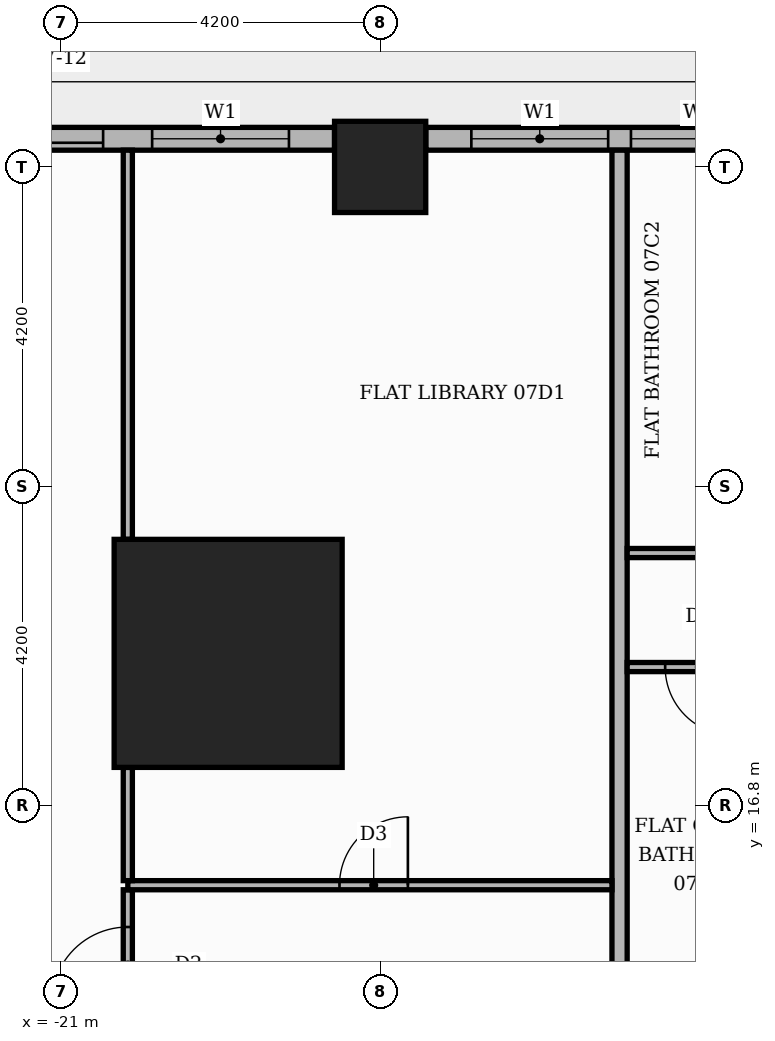
"""IFC4 building model, lengths in metres.
Left out: names, types, materials, properties, quantities, classifications, styles, units other than length and angle.
Written with IfcOpenShell. Run it as: python <this file> out.ifc"""

import sys

from ifc_helpers import new_model, si_unit, direction, frame, frame_2d, origin, origin_2d, place, context, subcontext, project, spatial, rectangle, extrude, element, fill, save


model = new_model("IFC4")
c1 = context("Model", 3, precision=1e-05, world=origin(), true_north=direction((0.0, 1.0)))
c2 = subcontext(c1, "Body", "Model", "MODEL_VIEW")
j1 = project(units=[si_unit("LENGTHUNIT", "METRE"), si_unit("PLANEANGLEUNIT", "RADIAN")], contexts=[c1])
p1 = place(None, origin())
s1 = spatial("IfcSite", under=j1, at=p1, CompositionType="ELEMENT")
p2 = place(p1, origin())
s2 = spatial("IfcBuilding", under=s1, at=p2, CompositionType="ELEMENT")
p3 = place(p2, frame((0.0, 0.0, 34.8)))
s3 = spatial("IfcBuildingStorey", under=s2, at=p3, CompositionType="ELEMENT", Elevation=34.8)
p4 = place(p3, frame((-18.8, 18.8, 0.0), z_axis=(0.0, 0.0, 1.0), x_axis=(1.0, 0.0, 0.0)))
e1 = element("IfcColumn", 1, at=p4, inside=s3, PredefinedType="COLUMN", context=c2, shape_type="SweptSolid", body=[
    extrude(rectangle(XDim=3.0, YDim=3.0, at=origin_2d()), origin(), (0.0, 0.0, 1.0), 3.9),
])
p5 = place(p3, frame((-16.8, 25.2, 0.0), z_axis=(0.0, 0.0, 1.0), x_axis=(1.0, 0.0, 0.0)))
e2 = element("IfcColumn", 2, at=p5, inside=s3, PredefinedType="COLUMN", context=c2, shape_type="SweptSolid", body=[
    extrude(rectangle(XDim=1.2, YDim=1.2, at=origin_2d()), origin(), (0.0, 0.0, 1.0), 3.9),
])
p6 = place(p3, frame((-9.0, 25.57, 0.0), z_axis=(0.0, 0.0, 1.0), x_axis=(-1.0, 0.0, 0.0)))
e3 = element("IfcWall", 3, at=p6, inside=s3, PredefinedType="STANDARD", context=c2, shape_type="SweptSolid", body=[
    extrude(rectangle(XDim=7.2, YDim=0.3, at=frame_2d((3.6, 0.0))), origin(), (0.0, 0.0, 1.0), 3.48),
])
p7 = place(p6, frame((0.6, 0.0, 0.9)))
e4 = element("IfcOpeningElement", 4, at=p7, cuts=e3, PredefinedType="OPENING", context=c2, shape_type="SweptSolid", body=[
    extrude(rectangle(XDim=1.8, YDim=2.1, at=frame_2d((0.9, 1.05))), frame((0.0, 0.16, 0.0), z_axis=(0.0, -1.0, 0.0), x_axis=(1.0, 0.0, 0.0)), (0.0, 0.0, 1.0), 0.32),
])
p8 = place(p6, frame((2.7, 0.0, 0.9)))
e5 = element("IfcOpeningElement", 5, at=p8, cuts=e3, PredefinedType="OPENING", context=c2, shape_type="SweptSolid", body=[
    extrude(rectangle(XDim=1.8, YDim=2.1, at=frame_2d((0.9, 1.05))), frame((0.0, 0.16, 0.0), z_axis=(0.0, -1.0, 0.0), x_axis=(1.0, 0.0, 0.0)), (0.0, 0.0, 1.0), 0.32),
])
p9 = place(p6, frame((4.8, 0.0, 0.9)))
e6 = element("IfcOpeningElement", 6, at=p9, cuts=e3, PredefinedType="OPENING", context=c2, shape_type="SweptSolid", body=[
    extrude(rectangle(XDim=1.8, YDim=2.1, at=frame_2d((0.9, 1.05))), frame((0.0, 0.16, 0.0), z_axis=(0.0, -1.0, 0.0), x_axis=(1.0, 0.0, 0.0)), (0.0, 0.0, 1.0), 0.32),
])
p10 = place(p3, frame((-17.4, 25.57, 0.0), z_axis=(0.0, 0.0, 1.0), x_axis=(-1.0, 0.0, 0.0)))
e7 = element("IfcWall", 7, at=p10, inside=s3, PredefinedType="STANDARD", context=c2, shape_type="SweptSolid", body=[
    extrude(rectangle(XDim=5.32, YDim=0.3, at=frame_2d((2.66, 0.0))), origin(), (0.0, 0.0, 1.0), 3.48),
])
p11 = place(p10, frame((0.6, 0.0, 0.9)))
e8 = element("IfcOpeningElement", 8, at=p11, cuts=e7, PredefinedType="OPENING", context=c2, shape_type="SweptSolid", body=[
    extrude(rectangle(XDim=1.8, YDim=2.1, at=frame_2d((0.9, 1.05))), frame((0.0, 0.16, 0.0), z_axis=(0.0, -1.0, 0.0), x_axis=(1.0, 0.0, 0.0)), (0.0, 0.0, 1.0), 0.32),
])
p12 = place(p10, frame((3.045, 0.0, 0.0)))
e9 = element("IfcOpeningElement", 9, at=p12, cuts=e7, PredefinedType="OPENING", context=c2, shape_type="SweptSolid", body=[
    extrude(rectangle(XDim=1.8, YDim=2.4, at=frame_2d((0.9, 1.2))), frame((0.0, 0.16, 0.0), z_axis=(0.0, -1.0, 0.0), x_axis=(1.0, 0.0, 0.0)), (0.0, 0.0, 1.0), 0.32),
])
p13 = place(p3, frame((-20.12, 13.71, 0.0), z_axis=(0.0, 0.0, 1.0), x_axis=(0.0, 1.0, 0.0)))
e10 = element("IfcWall", 10, at=p13, inside=s3, PredefinedType="PARTITIONING", context=c2, shape_type="SweptSolid", body=[
    extrude(rectangle(XDim=1.98, YDim=0.12, at=frame_2d((0.99, 0.0))), origin(), (0.0, 0.0, 1.0), 3.48),
])
p14 = place(p13, frame((0.49, 0.0, 0.0)))
e11 = element("IfcOpeningElement", 11, at=p14, cuts=e10, PredefinedType="OPENING", context=c2, shape_type="SweptSolid", body=[
    extrude(rectangle(XDim=1.0, YDim=2.1, at=frame_2d((0.5, 1.05))), frame((0.0, 0.07, 0.0), z_axis=(0.0, -1.0, 0.0), x_axis=(1.0, 0.0, 0.0)), (0.0, 0.0, 1.0), 0.14),
])
p15 = place(p3, frame((-13.65, 13.75, 0.0), z_axis=(0.0, 0.0, 1.0), x_axis=(0.0, 1.0, 0.0)))
e12 = element("IfcWall", 12, at=p15, inside=s3, PredefinedType="PARTITIONING", context=c2, shape_type="SweptSolid", body=[
    extrude(rectangle(XDim=11.67, YDim=0.2, at=frame_2d((5.835, 0.0))), origin(), (0.0, 0.0, 1.0), 3.48),
])
p16 = place(p3, frame((-20.12, 15.75, 0.0), z_axis=(0.0, 0.0, 1.0), x_axis=(1.0, 0.0, 0.0)))
e13 = element("IfcWall", 13, at=p16, inside=s3, PredefinedType="PARTITIONING", context=c2, shape_type="SweptSolid", body=[
    extrude(rectangle(XDim=6.37, YDim=0.12, at=frame_2d((3.185, 0.0))), origin(), (0.0, 0.0, 1.0), 3.48),
])
p17 = place(p16, frame((2.785, 0.0, 0.0)))
e14 = element("IfcOpeningElement", 14, at=p17, cuts=e13, PredefinedType="OPENING", context=c2, shape_type="SweptSolid", body=[
    extrude(rectangle(XDim=0.9, YDim=2.1, at=frame_2d((0.45, 1.05))), frame((0.0, 0.07, 0.0), z_axis=(0.0, -1.0, 0.0), x_axis=(1.0, 0.0, 0.0)), (0.0, 0.0, 1.0), 0.14),
])
p18 = place(p3, frame((-20.12, 15.81, 0.0), z_axis=(0.0, 0.0, 1.0), x_axis=(0.0, 1.0, 0.0)))
e15 = element("IfcWall", 15, at=p18, inside=s3, PredefinedType="PARTITIONING", context=c2, shape_type="SweptSolid", body=[
    extrude(rectangle(XDim=1.49, YDim=0.12, at=frame_2d((0.745, 0.0))), origin(), (0.0, 0.0, 1.0), 3.48),
])
p19 = place(p3, frame((-13.55, 18.62, 0.0), z_axis=(0.0, 0.0, 1.0), x_axis=(1.0, 0.0, 0.0)))
e16 = element("IfcWall", 16, at=p19, inside=s3, PredefinedType="PARTITIONING", context=c2, shape_type="SweptSolid", body=[
    extrude(rectangle(XDim=12.5, YDim=0.12, at=frame_2d((6.25, 0.0))), origin(), (0.0, 0.0, 1.0), 3.48),
])
p20 = place(p19, frame((8.75, 0.0, 0.0)))
e17 = element("IfcOpeningElement", 17, at=p20, cuts=e16, PredefinedType="OPENING", context=c2, shape_type="SweptSolid", body=[
    extrude(rectangle(XDim=0.9, YDim=2.1, at=frame_2d((0.45, 1.05))), frame((0.0, 0.07, 0.0), z_axis=(0.0, -1.0, 0.0), x_axis=(1.0, 0.0, 0.0)), (0.0, 0.0, 1.0), 0.14),
])
p21 = place(p19, frame((4.55, 0.0, 0.0)))
e18 = element("IfcOpeningElement", 18, at=p21, cuts=e16, PredefinedType="OPENING", context=c2, shape_type="SweptSolid", body=[
    extrude(rectangle(XDim=0.9, YDim=2.1, at=frame_2d((0.45, 1.05))), frame((0.0, 0.07, 0.0), z_axis=(0.0, -1.0, 0.0), x_axis=(1.0, 0.0, 0.0)), (0.0, 0.0, 1.0), 0.14),
])
p22 = place(p19, frame((2.6, 0.0, 0.0)))
e19 = element("IfcOpeningElement", 19, at=p22, cuts=e16, PredefinedType="OPENING", context=c2, shape_type="SweptSolid", body=[
    extrude(rectangle(XDim=0.9, YDim=2.1, at=frame_2d((0.45, 1.05))), frame((0.0, 0.07, 0.0), z_axis=(0.0, -1.0, 0.0), x_axis=(1.0, 0.0, 0.0)), (0.0, 0.0, 1.0), 0.14),
])
p23 = place(p19, frame((0.5, 0.0, 0.0)))
e20 = element("IfcOpeningElement", 20, at=p23, cuts=e16, PredefinedType="OPENING", context=c2, shape_type="SweptSolid", body=[
    extrude(rectangle(XDim=0.9, YDim=2.1, at=frame_2d((0.45, 1.05))), frame((0.0, 0.07, 0.0), z_axis=(0.0, -1.0, 0.0), x_axis=(1.0, 0.0, 0.0)), (0.0, 0.0, 1.0), 0.14),
])
p24 = place(p3, frame((-13.55, 20.12, 0.0), z_axis=(0.0, 0.0, 1.0), x_axis=(1.0, 0.0, 0.0)))
e21 = element("IfcWall", 21, at=p24, inside=s3, PredefinedType="PARTITIONING", context=c2, shape_type="SweptSolid", body=[
    extrude(rectangle(XDim=18.7, YDim=0.12, at=frame_2d((9.35, 0.0))), origin(), (0.0, 0.0, 1.0), 3.48),
])
p25 = place(p24, frame((16.2, 0.0, 0.0)))
e22 = element("IfcOpeningElement", 22, at=p25, cuts=e21, PredefinedType="OPENING", context=c2, shape_type="SweptSolid", body=[
    extrude(rectangle(XDim=1.0, YDim=2.1, at=frame_2d((0.5, 1.05))), frame((0.0, 0.07, 0.0), z_axis=(0.0, -1.0, 0.0), x_axis=(1.0, 0.0, 0.0)), (0.0, 0.0, 1.0), 0.14),
])
p26 = place(p24, frame((12.05, 0.0, 0.0)))
e23 = element("IfcOpeningElement", 23, at=p26, cuts=e21, PredefinedType="OPENING", context=c2, shape_type="SweptSolid", body=[
    extrude(rectangle(XDim=0.9, YDim=2.1, at=frame_2d((0.45, 1.05))), frame((0.0, 0.07, 0.0), z_axis=(0.0, -1.0, 0.0), x_axis=(1.0, 0.0, 0.0)), (0.0, 0.0, 1.0), 0.14),
])
p27 = place(p24, frame((3.65, 0.0, 0.0)))
e24 = element("IfcOpeningElement", 24, at=p27, cuts=e21, PredefinedType="OPENING", context=c2, shape_type="SweptSolid", body=[
    extrude(rectangle(XDim=0.9, YDim=2.1, at=frame_2d((0.45, 1.05))), frame((0.0, 0.07, 0.0), z_axis=(0.0, -1.0, 0.0), x_axis=(1.0, 0.0, 0.0)), (0.0, 0.0, 1.0), 0.14),
])
p28 = place(p3, frame((-20.12, 20.3, 0.0), z_axis=(0.0, 0.0, 1.0), x_axis=(0.0, 1.0, 0.0)))
e25 = element("IfcWall", 25, at=p28, inside=s3, PredefinedType="PARTITIONING", context=c2, shape_type="SweptSolid", body=[
    extrude(rectangle(XDim=5.12, YDim=0.12, at=frame_2d((2.56, 0.0))), origin(), (0.0, 0.0, 1.0), 3.48),
])
p29 = place(p8, origin())
e26 = element("IfcWindow", 26, at=p29, inside=s3, PartitioningType="SINGLE_PANEL", PredefinedType="WINDOW", context=c2, shape_type="SweptSolid", body=[
    extrude(rectangle(XDim=1.8, YDim=2.1, at=frame_2d((0.9, 1.05))), frame((0.0, 0.03, 0.0), z_axis=(0.0, -1.0, 0.0), x_axis=(1.0, 0.0, 0.0)), (0.0, 0.0, 1.0), 0.06),
])
fill(e5, e26)
p30 = place(p9, origin())
e27 = element("IfcWindow", 27, at=p30, inside=s3, PartitioningType="SINGLE_PANEL", PredefinedType="WINDOW", context=c2, shape_type="SweptSolid", body=[
    extrude(rectangle(XDim=1.8, YDim=2.1, at=frame_2d((0.9, 1.05))), frame((0.0, 0.03, 0.0), z_axis=(0.0, -1.0, 0.0), x_axis=(1.0, 0.0, 0.0)), (0.0, 0.0, 1.0), 0.06),
])
fill(e6, e27)
p31 = place(p11, origin())
e28 = element("IfcWindow", 28, at=p31, inside=s3, PartitioningType="SINGLE_PANEL", PredefinedType="WINDOW", context=c2, shape_type="SweptSolid", body=[
    extrude(rectangle(XDim=1.8, YDim=2.1, at=frame_2d((0.9, 1.05))), frame((0.0, 0.03, 0.0), z_axis=(0.0, -1.0, 0.0), x_axis=(1.0, 0.0, 0.0)), (0.0, 0.0, 1.0), 0.06),
])
fill(e8, e28)
p32 = place(p12, origin())
e29 = element("IfcDoor", 29, at=p32, inside=s3, OperationType="SLIDING_TO_RIGHT", PredefinedType="DOOR", context=c2, shape_type="SweptSolid", body=[
    extrude(rectangle(XDim=1.8, YDim=2.4, at=frame_2d((0.9, 1.2))), frame((0.0, 0.025, 0.0), z_axis=(0.0, -1.0, 0.0), x_axis=(1.0, 0.0, 0.0)), (0.0, 0.0, 1.0), 0.05),
])
fill(e9, e29)
p33 = place(p23, frame((0.9, 0.0, 0.0), z_axis=(0.0, 0.0, 1.0), x_axis=(-1.0, 0.0, 0.0)))
e30 = element("IfcDoor", 30, at=p33, inside=s3, OperationType="SINGLE_SWING_RIGHT", PredefinedType="DOOR", context=c2, shape_type="SweptSolid", body=[
    extrude(rectangle(XDim=0.9, YDim=2.1, at=frame_2d((0.45, 1.05))), frame((0.0, 0.025, 0.0), z_axis=(0.0, -1.0, 0.0), x_axis=(1.0, 0.0, 0.0)), (0.0, 0.0, 1.0), 0.05),
])
fill(e20, e30)
p34 = place(p17, origin())
e31 = element("IfcDoor", 31, at=p34, inside=s3, OperationType="SINGLE_SWING_RIGHT", PredefinedType="DOOR", context=c2, shape_type="SweptSolid", body=[
    extrude(rectangle(XDim=0.9, YDim=2.1, at=frame_2d((0.45, 1.05))), frame((0.0, 0.025, 0.0), z_axis=(0.0, -1.0, 0.0), x_axis=(1.0, 0.0, 0.0)), (0.0, 0.0, 1.0), 0.05),
])
fill(e14, e31)
p35 = place(p14, origin())
e32 = element("IfcDoor", 32, at=p35, inside=s3, OperationType="SINGLE_SWING_LEFT", PredefinedType="DOOR", context=c2, shape_type="SweptSolid", body=[
    extrude(rectangle(XDim=1.0, YDim=2.1, at=frame_2d((0.5, 1.05))), frame((0.0, 0.025, 0.0), z_axis=(0.0, -1.0, 0.0), x_axis=(1.0, 0.0, 0.0)), (0.0, 0.0, 1.0), 0.05),
])
fill(e11, e32)
save(model, sys.argv[1])
